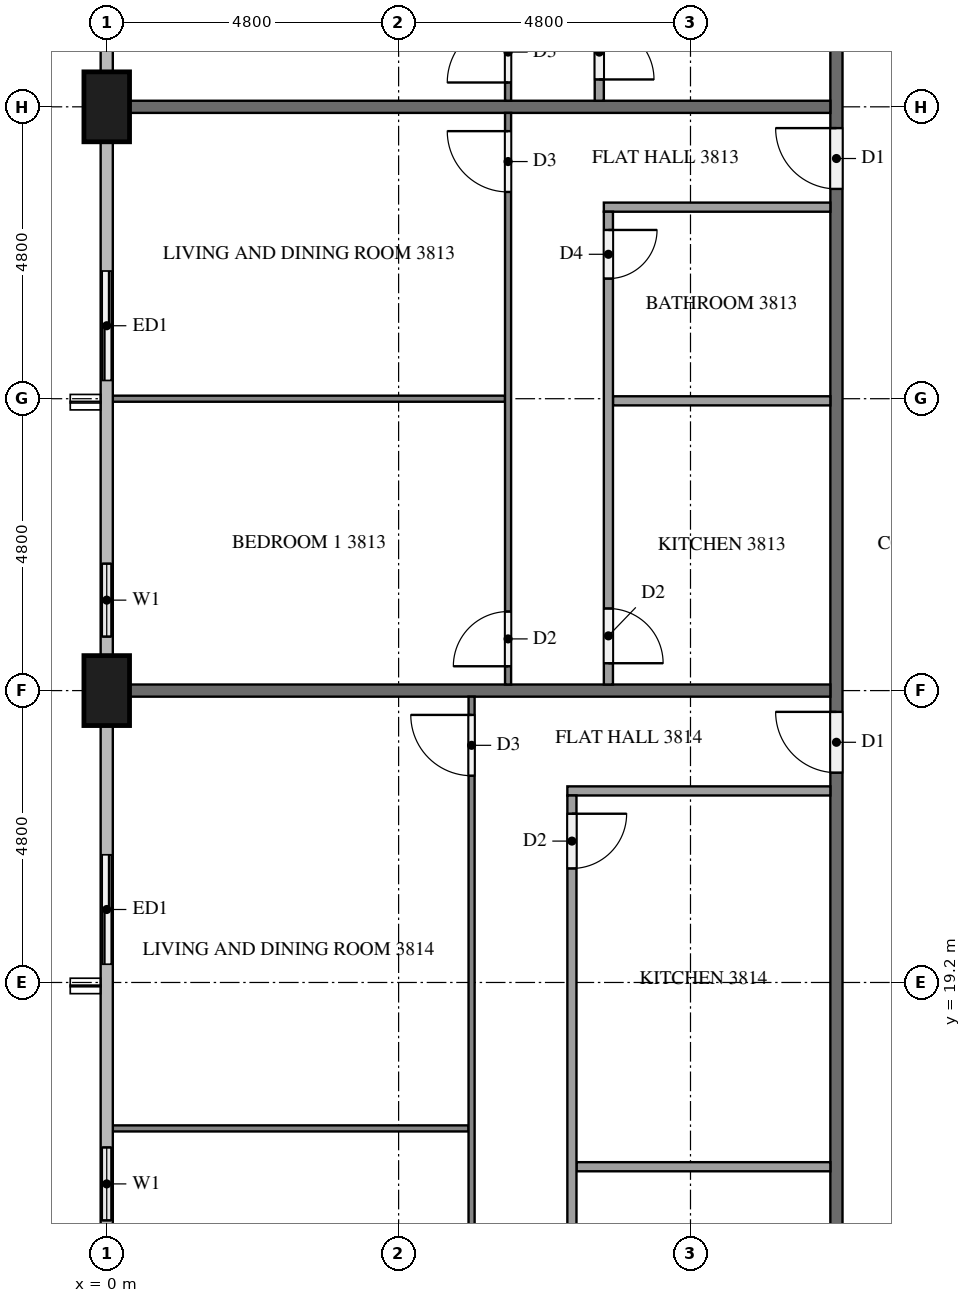
"""IFC4 building model, lengths in metres.
Left out: names, types, materials, properties, quantities, classifications, styles, units other than length and angle.
Written with IfcOpenShell. Run it as: python <this file> out.ifc"""

import sys

from ifc_helpers import new_model, si_unit, direction, frame, frame_2d, origin, origin_2d, place, context, subcontext, project, spatial, rectangle, extrude, element, fill, save


model = new_model("IFC4")
c1 = context("Model", 3, precision=1e-05, world=origin(), true_north=direction((0.0, 1.0)))
c2 = subcontext(c1, "Body", "Model", "MODEL_VIEW")
j1 = project(units=[si_unit("LENGTHUNIT", "METRE"), si_unit("PLANEANGLEUNIT", "RADIAN")], contexts=[c1])
p1 = place(None, origin())
s1 = spatial("IfcSite", under=j1, at=p1, CompositionType="ELEMENT")
p2 = place(p1, origin())
s2 = spatial("IfcBuilding", under=s1, at=p2, CompositionType="ELEMENT")
p3 = place(p2, frame((0.0, 0.0, 149.0)))
s3 = spatial("IfcBuildingStorey", under=s2, at=p3, CompositionType="ELEMENT", Elevation=149.0)
for number, where, z_axis, x_axis in (
    (1, (0.0, 33.6, 0.0), (0.0, 0.0, 1.0), (0.0, 1.0, 0.0)),
    (2, (0.0, 24.0, 0.0), (0.0, 0.0, 1.0), (0.0, 1.0, 0.0)),
):
    element("IfcColumn", number, at=place(p3, frame(where, z_axis=z_axis, x_axis=x_axis)), inside=s3, PredefinedType="COLUMN", context=c2, shape_type="SweptSolid", body=[
        extrude(rectangle(XDim=1.15, YDim=0.75, at=origin_2d()), origin(), (0.0, 0.0, 1.0), 3.2),
    ])
p4 = place(p3, frame((0.0, 31.2, 0.0), z_axis=(0.0, 0.0, 1.0), x_axis=(0.0, -1.0, 0.0)))
e3 = element("IfcWall", 3, at=p4, inside=s3, PredefinedType="SOLIDWALL", context=c2, shape_type="SweptSolid", body=[
    extrude(rectangle(XDim=2.4, YDim=0.15, at=frame_2d((1.2, 0.0))), origin(), (0.0, 0.0, 1.0), 3.2),
])
p5 = place(p4, frame((0.3, 0.0, 0.0)))
e4 = element("IfcOpeningElement", 4, at=p5, cuts=e3, PredefinedType="OPENING", context=c2, shape_type="SweptSolid", body=[
    extrude(rectangle(XDim=1.8, YDim=2.4, at=frame_2d((0.9, 1.2))), frame((0.0, 0.085, 0.0), z_axis=(0.0, -1.0, 0.0), x_axis=(1.0, 0.0, 0.0)), (0.0, 0.0, 1.0), 0.17),
])
p6 = place(p3, frame((0.0, 26.4, 0.0), z_axis=(0.0, 0.0, 1.0), x_axis=(0.0, -1.0, 0.0)))
e5 = element("IfcWall", 5, at=p6, inside=s3, PredefinedType="SOLIDWALL", context=c2, shape_type="SweptSolid", body=[
    extrude(rectangle(XDim=1.825, YDim=0.15, at=frame_2d((0.913, 0.0))), origin(), (0.0, 0.0, 1.0), 3.2),
])
p7 = place(p6, frame((0.312, 0.0, 0.9)))
e6 = element("IfcOpeningElement", 6, at=p7, cuts=e5, PredefinedType="OPENING", context=c2, shape_type="SweptSolid", body=[
    extrude(rectangle(XDim=1.2, YDim=1.4, at=frame_2d((0.6, 0.7))), frame((0.0, 0.085, 0.0), z_axis=(0.0, -1.0, 0.0), x_axis=(1.0, 0.0, 0.0)), (0.0, 0.0, 1.0), 0.17),
])
p8 = place(p3, frame((0.0, 21.6, 0.0), z_axis=(0.0, 0.0, 1.0), x_axis=(0.0, -1.0, 0.0)))
e7 = element("IfcWall", 7, at=p8, inside=s3, PredefinedType="SOLIDWALL", context=c2, shape_type="SweptSolid", body=[
    extrude(rectangle(XDim=2.4, YDim=0.15, at=frame_2d((1.2, 0.0))), origin(), (0.0, 0.0, 1.0), 3.2),
])
p9 = place(p8, frame((0.3, 0.0, 0.0)))
e8 = element("IfcOpeningElement", 8, at=p9, cuts=e7, PredefinedType="OPENING", context=c2, shape_type="SweptSolid", body=[
    extrude(rectangle(XDim=1.8, YDim=2.4, at=frame_2d((0.9, 1.2))), frame((0.0, 0.085, 0.0), z_axis=(0.0, -1.0, 0.0), x_axis=(1.0, 0.0, 0.0)), (0.0, 0.0, 1.0), 0.17),
])
p10 = place(p3, frame((0.0, 16.8, 0.0), z_axis=(0.0, 0.0, 1.0), x_axis=(0.0, -1.0, 0.0)))
e9 = element("IfcWall", 9, at=p10, inside=s3, PredefinedType="SOLIDWALL", context=c2, shape_type="SweptSolid", body=[
    extrude(rectangle(XDim=1.825, YDim=0.15, at=frame_2d((0.913, 0.0))), origin(), (0.0, 0.0, 1.0), 3.2),
])
p11 = place(p10, frame((0.312, 0.0, 0.9)))
e10 = element("IfcOpeningElement", 10, at=p11, cuts=e9, PredefinedType="OPENING", context=c2, shape_type="SweptSolid", body=[
    extrude(rectangle(XDim=1.2, YDim=1.4, at=frame_2d((0.6, 0.7))), frame((0.0, 0.085, 0.0), z_axis=(0.0, -1.0, 0.0), x_axis=(1.0, 0.0, 0.0)), (0.0, 0.0, 1.0), 0.17),
])
p12 = place(p3, frame((12.0, 12.1, 0.0), z_axis=(0.0, 0.0, 1.0), x_axis=(0.0, 1.0, 0.0)))
e11 = element("IfcWall", 11, at=p12, inside=s3, PredefinedType="PARTITIONING", context=c2, shape_type="SweptSolid", body=[
    extrude(rectangle(XDim=28.6, YDim=0.2, at=frame_2d((14.3, 0.0))), origin(), (0.0, 0.0, 1.0), 3.2),
])
p13 = place(p12, frame((27.35, 0.0, 0.0)))
e12 = element("IfcOpeningElement", 12, at=p13, cuts=e11, PredefinedType="OPENING", context=c2, shape_type="SweptSolid", body=[
    extrude(rectangle(XDim=1.0, YDim=2.1, at=frame_2d((0.5, 1.05))), frame((0.0, 0.11, 0.0), z_axis=(0.0, -1.0, 0.0), x_axis=(1.0, 0.0, 0.0)), (0.0, 0.0, 1.0), 0.22),
])
p14 = place(p12, frame((20.15, 0.0, 0.0)))
e13 = element("IfcOpeningElement", 13, at=p14, cuts=e11, PredefinedType="OPENING", context=c2, shape_type="SweptSolid", body=[
    extrude(rectangle(XDim=1.0, YDim=2.1, at=frame_2d((0.5, 1.05))), frame((0.0, 0.11, 0.0), z_axis=(0.0, -1.0, 0.0), x_axis=(1.0, 0.0, 0.0)), (0.0, 0.0, 1.0), 0.22),
])
p15 = place(p12, frame((10.55, 0.0, 0.0)))
e14 = element("IfcOpeningElement", 14, at=p15, cuts=e11, PredefinedType="OPENING", context=c2, shape_type="SweptSolid", body=[
    extrude(rectangle(XDim=1.0, YDim=2.1, at=frame_2d((0.5, 1.05))), frame((0.0, 0.11, 0.0), z_axis=(0.0, -1.0, 0.0), x_axis=(1.0, 0.0, 0.0)), (0.0, 0.0, 1.0), 0.22),
])
for number, where, z_axis, x_axis in (
    (15, (0.375, 33.6, 0.0), (0.0, 0.0, 1.0), (1.0, 0.0, 0.0)),
    (16, (0.375, 24.0, 0.0), (0.0, 0.0, 1.0), (1.0, 0.0, 0.0)),
):
    element("IfcWall", number, at=place(p3, frame(where, z_axis=z_axis, x_axis=x_axis)), inside=s3, PredefinedType="PARTITIONING", context=c2, shape_type="SweptSolid", body=[
        extrude(rectangle(XDim=11.525, YDim=0.2, at=frame_2d((5.762, 0.0))), origin(), (0.0, 0.0, 1.0), 3.2),
    ])
p16 = place(p3, frame((6.6, 33.7, 0.0), z_axis=(0.0, 0.0, 1.0), x_axis=(0.0, 1.0, 0.0)))
e17 = element("IfcWall", 17, at=p16, inside=s3, PredefinedType="PARTITIONING", context=c2, shape_type="SweptSolid", body=[
    extrude(rectangle(XDim=7.0, YDim=0.1, at=frame_2d((3.5, 0.0))), origin(), (0.0, 0.0, 1.0), 3.2),
])
p17 = place(p16, frame((0.3, 0.0, 0.0)))
e18 = element("IfcOpeningElement", 18, at=p17, cuts=e17, PredefinedType="OPENING", context=c2, shape_type="SweptSolid", body=[
    extrude(rectangle(XDim=1.0, YDim=2.1, at=frame_2d((0.5, 1.05))), frame((0.0, 0.06, 0.0), z_axis=(0.0, -1.0, 0.0), x_axis=(1.0, 0.0, 0.0)), (0.0, 0.0, 1.0), 0.12),
])
p18 = place(p3, frame((8.1, 39.075, 0.0), z_axis=(0.0, 0.0, 1.0), x_axis=(0.0, -1.0, 0.0)))
e19 = element("IfcWall", 19, at=p18, inside=s3, PredefinedType="PARTITIONING", context=c2, shape_type="SweptSolid", body=[
    extrude(rectangle(XDim=5.375, YDim=0.15, at=frame_2d((2.688, 0.0))), origin(), (0.0, 0.0, 1.0), 3.2),
])
p19 = place(p18, frame((0.3, 0.0, 0.0)))
e20 = element("IfcOpeningElement", 20, at=p19, cuts=e19, PredefinedType="OPENING", context=c2, shape_type="SweptSolid", body=[
    extrude(rectangle(XDim=0.8, YDim=2.1, at=frame_2d((0.4, 1.05))), frame((0.0, 0.085, 0.0), z_axis=(0.0, -1.0, 0.0), x_axis=(1.0, 0.0, 0.0)), (0.0, 0.0, 1.0), 0.17),
])
p20 = place(p18, frame((4.125, 0.0, 0.0)))
e21 = element("IfcOpeningElement", 21, at=p20, cuts=e19, PredefinedType="OPENING", context=c2, shape_type="SweptSolid", body=[
    extrude(rectangle(XDim=0.9, YDim=2.1, at=frame_2d((0.45, 1.05))), frame((0.0, 0.085, 0.0), z_axis=(0.0, -1.0, 0.0), x_axis=(1.0, 0.0, 0.0)), (0.0, 0.0, 1.0), 0.17),
])
p21 = place(p3, frame((6.55, 28.8, 0.0), z_axis=(0.0, 0.0, 1.0), x_axis=(-1.0, 0.0, 0.0)))
e22 = element("IfcWall", 22, at=p21, inside=s3, PredefinedType="PARTITIONING", context=c2, shape_type="SweptSolid", body=[
    extrude(rectangle(XDim=6.45, YDim=0.1, at=frame_2d((3.225, 0.0))), origin(), (0.0, 0.0, 1.0), 3.2),
])
p22 = place(p3, frame((6.6, 24.1, 0.0), z_axis=(0.0, 0.0, 1.0), x_axis=(0.0, 1.0, 0.0)))
e23 = element("IfcWall", 23, at=p22, inside=s3, PredefinedType="PARTITIONING", context=c2, shape_type="SweptSolid", body=[
    extrude(rectangle(XDim=9.4, YDim=0.1, at=frame_2d((4.7, 0.0))), origin(), (0.0, 0.0, 1.0), 3.2),
])
p23 = place(p22, frame((8.1, 0.0, 0.0)))
e24 = element("IfcOpeningElement", 24, at=p23, cuts=e23, PredefinedType="OPENING", context=c2, shape_type="SweptSolid", body=[
    extrude(rectangle(XDim=1.0, YDim=2.1, at=frame_2d((0.5, 1.05))), frame((0.0, 0.06, 0.0), z_axis=(0.0, -1.0, 0.0), x_axis=(1.0, 0.0, 0.0)), (0.0, 0.0, 1.0), 0.12),
])
p24 = place(p22, frame((0.3, 0.0, 0.0)))
e25 = element("IfcOpeningElement", 25, at=p24, cuts=e23, PredefinedType="OPENING", context=c2, shape_type="SweptSolid", body=[
    extrude(rectangle(XDim=0.9, YDim=2.1, at=frame_2d((0.45, 1.05))), frame((0.0, 0.06, 0.0), z_axis=(0.0, -1.0, 0.0), x_axis=(1.0, 0.0, 0.0)), (0.0, 0.0, 1.0), 0.12),
])
p25 = place(p3, frame((11.9, 28.765, 0.0), z_axis=(0.0, 0.0, 1.0), x_axis=(-1.0, 0.0, 0.0)))
e26 = element("IfcWall", 26, at=p25, inside=s3, PredefinedType="PARTITIONING", context=c2, shape_type="SweptSolid", body=[
    extrude(rectangle(XDim=3.575, YDim=0.15, at=frame_2d((1.788, 0.0))), origin(), (0.0, 0.0, 1.0), 3.2),
])
p26 = place(p3, frame((11.9, 31.95, 0.0), z_axis=(0.0, 0.0, 1.0), x_axis=(-1.0, 0.0, 0.0)))
e27 = element("IfcWall", 27, at=p26, inside=s3, PredefinedType="PARTITIONING", context=c2, shape_type="SweptSolid", body=[
    extrude(rectangle(XDim=3.725, YDim=0.15, at=frame_2d((1.862, 0.0))), origin(), (0.0, 0.0, 1.0), 3.2),
])
p27 = place(p3, frame((8.25, 31.875, 0.0), z_axis=(0.0, 0.0, 1.0), x_axis=(0.0, -1.0, 0.0)))
e28 = element("IfcWall", 28, at=p27, inside=s3, PredefinedType="PARTITIONING", context=c2, shape_type="SweptSolid", body=[
    extrude(rectangle(XDim=7.775, YDim=0.15, at=frame_2d((3.887, 0.0))), origin(), (0.0, 0.0, 1.0), 3.2),
])
p28 = place(p27, frame((0.3, 0.0, 0.0)))
e29 = element("IfcOpeningElement", 29, at=p28, cuts=e28, PredefinedType="OPENING", context=c2, shape_type="SweptSolid", body=[
    extrude(rectangle(XDim=0.8, YDim=2.1, at=frame_2d((0.4, 1.05))), frame((0.0, 0.085, 0.0), z_axis=(0.0, -1.0, 0.0), x_axis=(1.0, 0.0, 0.0)), (0.0, 0.0, 1.0), 0.17),
])
p29 = place(p27, frame((6.525, 0.0, 0.0)))
e30 = element("IfcOpeningElement", 30, at=p29, cuts=e28, PredefinedType="OPENING", context=c2, shape_type="SweptSolid", body=[
    extrude(rectangle(XDim=0.9, YDim=2.1, at=frame_2d((0.45, 1.05))), frame((0.0, 0.085, 0.0), z_axis=(0.0, -1.0, 0.0), x_axis=(1.0, 0.0, 0.0)), (0.0, 0.0, 1.0), 0.17),
])
p30 = place(p3, frame((5.95, 16.8, 0.0), z_axis=(0.0, 0.0, 1.0), x_axis=(-1.0, 0.0, 0.0)))
e31 = element("IfcWall", 31, at=p30, inside=s3, PredefinedType="PARTITIONING", context=c2, shape_type="SweptSolid", body=[
    extrude(rectangle(XDim=5.85, YDim=0.1, at=frame_2d((2.925, 0.0))), origin(), (0.0, 0.0, 1.0), 3.2),
])
p31 = place(p3, frame((6.0, 12.1, 0.0), z_axis=(0.0, 0.0, 1.0), x_axis=(0.0, 1.0, 0.0)))
e32 = element("IfcWall", 32, at=p31, inside=s3, PredefinedType="PARTITIONING", context=c2, shape_type="SweptSolid", body=[
    extrude(rectangle(XDim=11.8, YDim=0.1, at=frame_2d((5.9, 0.0))), origin(), (0.0, 0.0, 1.0), 3.2),
])
p32 = place(p31, frame((10.5, 0.0, 0.0)))
e33 = element("IfcOpeningElement", 33, at=p32, cuts=e32, PredefinedType="OPENING", context=c2, shape_type="SweptSolid", body=[
    extrude(rectangle(XDim=1.0, YDim=2.1, at=frame_2d((0.5, 1.05))), frame((0.0, 0.06, 0.0), z_axis=(0.0, -1.0, 0.0), x_axis=(1.0, 0.0, 0.0)), (0.0, 0.0, 1.0), 0.12),
])
p33 = place(p31, frame((0.3, 0.0, 0.0)))
e34 = element("IfcOpeningElement", 34, at=p33, cuts=e32, PredefinedType="OPENING", context=c2, shape_type="SweptSolid", body=[
    extrude(rectangle(XDim=0.9, YDim=2.1, at=frame_2d((0.45, 1.05))), frame((0.0, 0.06, 0.0), z_axis=(0.0, -1.0, 0.0), x_axis=(1.0, 0.0, 0.0)), (0.0, 0.0, 1.0), 0.12),
])
p34 = place(p3, frame((11.9, 16.17, 0.0), z_axis=(0.0, 0.0, 1.0), x_axis=(-1.0, 0.0, 0.0)))
e35 = element("IfcWall", 35, at=p34, inside=s3, PredefinedType="PARTITIONING", context=c2, shape_type="SweptSolid", body=[
    extrude(rectangle(XDim=4.175, YDim=0.15, at=frame_2d((2.087, 0.0))), origin(), (0.0, 0.0, 1.0), 3.2),
])
p35 = place(p3, frame((11.9, 22.35, 0.0), z_axis=(0.0, 0.0, 1.0), x_axis=(-1.0, 0.0, 0.0)))
e36 = element("IfcWall", 36, at=p35, inside=s3, PredefinedType="PARTITIONING", context=c2, shape_type="SweptSolid", body=[
    extrude(rectangle(XDim=4.325, YDim=0.15, at=frame_2d((2.163, 0.0))), origin(), (0.0, 0.0, 1.0), 3.2),
])
p36 = place(p3, frame((7.65, 22.275, 0.0), z_axis=(0.0, 0.0, 1.0), x_axis=(0.0, -1.0, 0.0)))
e37 = element("IfcWall", 37, at=p36, inside=s3, PredefinedType="PARTITIONING", context=c2, shape_type="SweptSolid", body=[
    extrude(rectangle(XDim=10.175, YDim=0.15, at=frame_2d((5.087, 0.0))), origin(), (0.0, 0.0, 1.0), 3.2),
])
p37 = place(p36, frame((0.3, 0.0, 0.0)))
e38 = element("IfcOpeningElement", 38, at=p37, cuts=e37, PredefinedType="OPENING", context=c2, shape_type="SweptSolid", body=[
    extrude(rectangle(XDim=0.9, YDim=2.1, at=frame_2d((0.45, 1.05))), frame((0.0, 0.085, 0.0), z_axis=(0.0, -1.0, 0.0), x_axis=(1.0, 0.0, 0.0)), (0.0, 0.0, 1.0), 0.17),
])
p38 = place(p36, frame((9.025, 0.0, 0.0)))
e39 = element("IfcOpeningElement", 39, at=p38, cuts=e37, PredefinedType="OPENING", context=c2, shape_type="SweptSolid", body=[
    extrude(rectangle(XDim=0.8, YDim=2.1, at=frame_2d((0.4, 1.05))), frame((0.0, 0.085, 0.0), z_axis=(0.0, -1.0, 0.0), x_axis=(1.0, 0.0, 0.0)), (0.0, 0.0, 1.0), 0.17),
])
p39 = place(p5, origin())
e40 = element("IfcDoor", 40, at=p39, inside=s3, OperationType="SLIDING_TO_RIGHT", PredefinedType="DOOR", context=c2, shape_type="SweptSolid", body=[
    extrude(rectangle(XDim=1.8, YDim=2.4, at=frame_2d((0.9, 1.2))), frame((0.0, 0.025, 0.0), z_axis=(0.0, -1.0, 0.0), x_axis=(1.0, 0.0, 0.0)), (0.0, 0.0, 1.0), 0.05),
])
fill(e4, e40)
p40 = place(p7, origin())
e41 = element("IfcWindow", 41, at=p40, inside=s3, PartitioningType="SINGLE_PANEL", PredefinedType="WINDOW", context=c2, shape_type="SweptSolid", body=[
    extrude(rectangle(XDim=1.2, YDim=1.4, at=frame_2d((0.6, 0.7))), frame((0.0, 0.03, 0.0), z_axis=(0.0, -1.0, 0.0), x_axis=(1.0, 0.0, 0.0)), (0.0, 0.0, 1.0), 0.06),
])
fill(e6, e41)
p41 = place(p9, origin())
e42 = element("IfcDoor", 42, at=p41, inside=s3, OperationType="SLIDING_TO_LEFT", PredefinedType="DOOR", context=c2, shape_type="SweptSolid", body=[
    extrude(rectangle(XDim=1.8, YDim=2.4, at=frame_2d((0.9, 1.2))), frame((0.0, 0.025, 0.0), z_axis=(0.0, -1.0, 0.0), x_axis=(1.0, 0.0, 0.0)), (0.0, 0.0, 1.0), 0.05),
])
fill(e8, e42)
p42 = place(p11, origin())
e43 = element("IfcWindow", 43, at=p42, inside=s3, PartitioningType="SINGLE_PANEL", PredefinedType="WINDOW", context=c2, shape_type="SweptSolid", body=[
    extrude(rectangle(XDim=1.2, YDim=1.4, at=frame_2d((0.6, 0.7))), frame((0.0, 0.03, 0.0), z_axis=(0.0, -1.0, 0.0), x_axis=(1.0, 0.0, 0.0)), (0.0, 0.0, 1.0), 0.06),
])
fill(e10, e43)
p43 = place(p14, origin())
e44 = element("IfcDoor", 44, at=p43, inside=s3, OperationType="SINGLE_SWING_RIGHT", PredefinedType="DOOR", context=c2, shape_type="SweptSolid", body=[
    extrude(rectangle(XDim=1.0, YDim=2.1, at=frame_2d((0.5, 1.05))), frame((0.0, 0.025, 0.0), z_axis=(0.0, -1.0, 0.0), x_axis=(1.0, 0.0, 0.0)), (0.0, 0.0, 1.0), 0.05),
])
fill(e13, e44)
p44 = place(p15, origin())
e45 = element("IfcDoor", 45, at=p44, inside=s3, OperationType="SINGLE_SWING_RIGHT", PredefinedType="DOOR", context=c2, shape_type="SweptSolid", body=[
    extrude(rectangle(XDim=1.0, YDim=2.1, at=frame_2d((0.5, 1.05))), frame((0.0, 0.025, 0.0), z_axis=(0.0, -1.0, 0.0), x_axis=(1.0, 0.0, 0.0)), (0.0, 0.0, 1.0), 0.05),
])
fill(e14, e45)
p45 = place(p17, origin())
e46 = element("IfcDoor", 46, at=p45, inside=s3, OperationType="SINGLE_SWING_LEFT", PredefinedType="DOOR", context=c2, shape_type="SweptSolid", body=[
    extrude(rectangle(XDim=1.0, YDim=2.1, at=frame_2d((0.5, 1.05))), frame((0.0, 0.025, 0.0), z_axis=(0.0, -1.0, 0.0), x_axis=(1.0, 0.0, 0.0)), (0.0, 0.0, 1.0), 0.05),
])
fill(e18, e46)
p46 = place(p20, origin())
e47 = element("IfcDoor", 47, at=p46, inside=s3, OperationType="SINGLE_SWING_RIGHT", PredefinedType="DOOR", context=c2, shape_type="SweptSolid", body=[
    extrude(rectangle(XDim=0.9, YDim=2.1, at=frame_2d((0.45, 1.05))), frame((0.0, 0.025, 0.0), z_axis=(0.0, -1.0, 0.0), x_axis=(1.0, 0.0, 0.0)), (0.0, 0.0, 1.0), 0.05),
])
fill(e21, e47)
p47 = place(p23, origin())
e48 = element("IfcDoor", 48, at=p47, inside=s3, OperationType="SINGLE_SWING_RIGHT", PredefinedType="DOOR", context=c2, shape_type="SweptSolid", body=[
    extrude(rectangle(XDim=1.0, YDim=2.1, at=frame_2d((0.5, 1.05))), frame((0.0, 0.025, 0.0), z_axis=(0.0, -1.0, 0.0), x_axis=(1.0, 0.0, 0.0)), (0.0, 0.0, 1.0), 0.05),
])
fill(e24, e48)
p48 = place(p24, origin())
e49 = element("IfcDoor", 49, at=p48, inside=s3, OperationType="SINGLE_SWING_LEFT", PredefinedType="DOOR", context=c2, shape_type="SweptSolid", body=[
    extrude(rectangle(XDim=0.9, YDim=2.1, at=frame_2d((0.45, 1.05))), frame((0.0, 0.025, 0.0), z_axis=(0.0, -1.0, 0.0), x_axis=(1.0, 0.0, 0.0)), (0.0, 0.0, 1.0), 0.05),
])
fill(e25, e49)
p49 = place(p28, origin())
e50 = element("IfcDoor", 50, at=p49, inside=s3, OperationType="SINGLE_SWING_LEFT", PredefinedType="DOOR", context=c2, shape_type="SweptSolid", body=[
    extrude(rectangle(XDim=0.8, YDim=2.1, at=frame_2d((0.4, 1.05))), frame((0.0, 0.025, 0.0), z_axis=(0.0, -1.0, 0.0), x_axis=(1.0, 0.0, 0.0)), (0.0, 0.0, 1.0), 0.05),
])
fill(e29, e50)
p50 = place(p29, origin())
e51 = element("IfcDoor", 51, at=p50, inside=s3, OperationType="SINGLE_SWING_RIGHT", PredefinedType="DOOR", context=c2, shape_type="SweptSolid", body=[
    extrude(rectangle(XDim=0.9, YDim=2.1, at=frame_2d((0.45, 1.05))), frame((0.0, 0.025, 0.0), z_axis=(0.0, -1.0, 0.0), x_axis=(1.0, 0.0, 0.0)), (0.0, 0.0, 1.0), 0.05),
])
fill(e30, e51)
p51 = place(p32, origin())
e52 = element("IfcDoor", 52, at=p51, inside=s3, OperationType="SINGLE_SWING_RIGHT", PredefinedType="DOOR", context=c2, shape_type="SweptSolid", body=[
    extrude(rectangle(XDim=1.0, YDim=2.1, at=frame_2d((0.5, 1.05))), frame((0.0, 0.025, 0.0), z_axis=(0.0, -1.0, 0.0), x_axis=(1.0, 0.0, 0.0)), (0.0, 0.0, 1.0), 0.05),
])
fill(e33, e52)
p52 = place(p37, origin())
e53 = element("IfcDoor", 53, at=p52, inside=s3, OperationType="SINGLE_SWING_LEFT", PredefinedType="DOOR", context=c2, shape_type="SweptSolid", body=[
    extrude(rectangle(XDim=0.9, YDim=2.1, at=frame_2d((0.45, 1.05))), frame((0.0, 0.025, 0.0), z_axis=(0.0, -1.0, 0.0), x_axis=(1.0, 0.0, 0.0)), (0.0, 0.0, 1.0), 0.05),
])
fill(e38, e53)
save(model, sys.argv[1])
